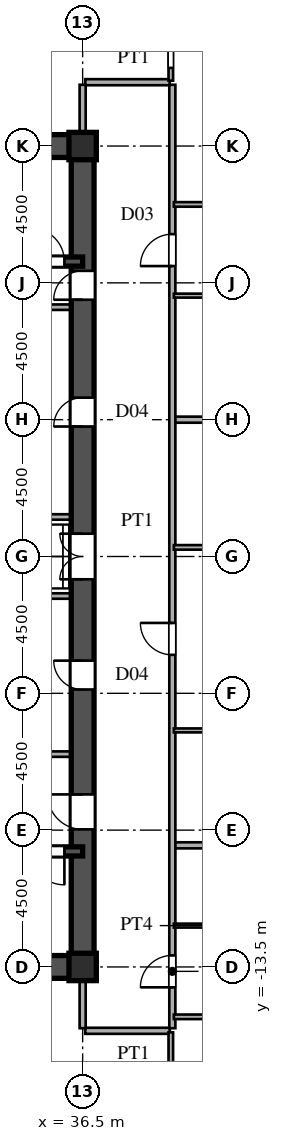
"""IFC4 building model, lengths in metres.
Left out: names, types, materials, properties, quantities, classifications, styles, units other than length and angle.
Written with IfcOpenShell. Run it as: python <this file> out.ifc"""

import sys

from ifc_helpers import new_model, si_unit, direction, frame, frame_2d, origin, origin_2d, place, context, subcontext, project, spatial, rectangle, i_section, extrude, source, transform, mapped, element, fill, save


model = new_model("IFC4")
c1 = context("Model", 3, precision=1e-05, world=origin(), true_north=direction((0.0, 1.0)))
c2 = subcontext(c1, "Body", "Model", "MODEL_VIEW")
j1 = project(units=[si_unit("LENGTHUNIT", "METRE"), si_unit("PLANEANGLEUNIT", "RADIAN")], contexts=[c1])
p1 = place(None, origin())
s1 = spatial("IfcSite", under=j1, at=p1, CompositionType="ELEMENT")
p2 = place(p1, origin())
s2 = spatial("IfcBuilding", under=s1, at=p2, CompositionType="ELEMENT")
p3 = place(p2, frame((0.0, 0.0, 22.5)))
s3 = spatial("IfcBuildingStorey", under=s2, at=p3, CompositionType="ELEMENT", Elevation=22.5)
m1 = source(origin(), c2, "Body", "SweptSolid", [
    extrude(i_section(OverallWidth=0.9, OverallDepth=0.9, WebThickness=0.036, FlangeThickness=0.055, at=origin_2d()), origin(), (0.0, 0.0, 1.0), 3.6),
])
for number, where, z_axis, x_axis in (
    (1, (36.5, -13.5, 0.0), (0.0, 0.0, 1.0), (1.0, 0.0, 0.0)),
    (2, (36.5, 13.5, 0.0), (0.0, 0.0, 1.0), (1.0, 0.0, 0.0)),
):
    element("IfcColumn", number, at=place(p3, frame(where, z_axis=z_axis, x_axis=x_axis)), inside=s3, PredefinedType="COLUMN", context=c2, shape_type="MappedRepresentation", body=[
        mapped(m1, transform((0.0, 0.0, 0.0), scale=1.0)),
    ])
for number, where, z_axis, x_axis in (
    (3, (27.5, -13.5, 0.0), (0.0, 0.0, 1.0), (1.0, 0.0, 0.0)),
    (4, (27.5, 13.5, 0.0), (0.0, 0.0, 1.0), (1.0, 0.0, 0.0)),
):
    element("IfcWall", number, at=place(p3, frame(where, z_axis=z_axis, x_axis=x_axis)), inside=s3, PredefinedType="SHEAR", context=c2, shape_type="SweptSolid", body=[
        extrude(rectangle(XDim=9.0, YDim=0.75, at=frame_2d((4.5, 0.0))), origin(), (0.0, 0.0, 1.0), 3.38),
    ])
p4 = place(p3, frame((36.5, -13.65, 0.0), z_axis=(0.0, 0.0, 1.0), x_axis=(0.0, 1.0, 0.0)))
e5 = element("IfcWall", 5, at=p4, inside=s3, PredefinedType="SHEAR", context=c2, shape_type="SweptSolid", body=[
    extrude(rectangle(XDim=7.15, YDim=0.75, at=frame_2d((3.575, 0.0))), origin(), (0.0, 0.0, 1.0), 3.38),
])
p5 = place(p4, frame((4.675, 0.0, 0.0)))
e6 = element("IfcOpeningElement", 6, at=p5, cuts=e5, PredefinedType="OPENING", context=c2, shape_type="SweptSolid", body=[
    extrude(rectangle(XDim=1.15, YDim=2.2, at=frame_2d((0.575, 1.1))), frame((0.0, 0.385, 0.0), z_axis=(0.0, -1.0, 0.0), x_axis=(1.0, 0.0, 0.0)), (0.0, 0.0, 1.0), 0.77),
])
p6 = place(p3, frame((36.5, -1.3, 0.0), z_axis=(0.0, 0.0, 1.0), x_axis=(0.0, 1.0, 0.0)))
e7 = element("IfcWall", 7, at=p6, inside=s3, PredefinedType="SHEAR", context=c2, shape_type="SweptSolid", body=[
    extrude(rectangle(XDim=2.6, YDim=0.75, at=frame_2d((1.3, 0.0))), origin(), (0.0, 0.0, 1.0), 3.38),
])
p7 = place(p6, frame((0.55, 0.0, 0.0)))
e8 = element("IfcOpeningElement", 8, at=p7, cuts=e7, PredefinedType="OPENING", context=c2, shape_type="SweptSolid", body=[
    extrude(rectangle(XDim=1.5, YDim=2.3, at=frame_2d((0.75, 1.15))), frame((0.0, 0.385, 0.0), z_axis=(0.0, -1.0, 0.0), x_axis=(1.0, 0.0, 0.0)), (0.0, 0.0, 1.0), 0.77),
])
p8 = place(p3, frame((36.5, 8.2, 0.0), z_axis=(0.0, 0.0, 1.0), x_axis=(0.0, 1.0, 0.0)))
e9 = element("IfcWall", 9, at=p8, inside=s3, PredefinedType="SHEAR", context=c2, shape_type="SweptSolid", body=[
    extrude(rectangle(XDim=5.45, YDim=0.75, at=frame_2d((2.725, 0.0))), origin(), (0.0, 0.0, 1.0), 3.38),
])
p9 = place(p8, frame((0.245, 0.0, 0.0)))
e10 = element("IfcOpeningElement", 10, at=p9, cuts=e9, PredefinedType="OPENING", context=c2, shape_type="SweptSolid", body=[
    extrude(rectangle(XDim=0.95, YDim=2.15, at=frame_2d((0.475, 1.075))), frame((0.0, 0.385, 0.0), z_axis=(0.0, -1.0, 0.0), x_axis=(1.0, 0.0, 0.0)), (0.0, 0.0, 1.0), 0.77),
])
p10 = place(p3, frame((36.5, -6.5, 0.0), z_axis=(0.0, 0.0, 1.0), x_axis=(0.0, 1.0, 0.0)))
e11 = element("IfcWall", 11, at=p10, inside=s3, PredefinedType="SHEAR", context=c2, shape_type="SweptSolid", body=[
    extrude(rectangle(XDim=5.2, YDim=0.75, at=frame_2d((2.6, 0.0))), origin(), (0.0, 0.0, 1.0), 3.38),
])
p11 = place(p10, frame((2.125, 0.0, 0.0)))
e12 = element("IfcOpeningElement", 12, at=p11, cuts=e11, PredefinedType="OPENING", context=c2, shape_type="SweptSolid", body=[
    extrude(rectangle(XDim=0.95, YDim=2.15, at=frame_2d((0.475, 1.075))), frame((0.0, 0.385, 0.0), z_axis=(0.0, -1.0, 0.0), x_axis=(1.0, 0.0, 0.0)), (0.0, 0.0, 1.0), 0.77),
])
p12 = place(p3, frame((36.5, 1.3, 0.0), z_axis=(0.0, 0.0, 1.0), x_axis=(0.0, 1.0, 0.0)))
e13 = element("IfcWall", 13, at=p12, inside=s3, PredefinedType="SHEAR", context=c2, shape_type="SweptSolid", body=[
    extrude(rectangle(XDim=6.9, YDim=0.75, at=frame_2d((3.45, 0.0))), origin(), (0.0, 0.0, 1.0), 3.38),
])
p13 = place(p12, frame((2.975, 0.0, 0.0)))
e14 = element("IfcOpeningElement", 14, at=p13, cuts=e13, PredefinedType="OPENING", context=c2, shape_type="SweptSolid", body=[
    extrude(rectangle(XDim=0.95, YDim=2.15, at=frame_2d((0.475, 1.075))), frame((0.0, 0.385, 0.0), z_axis=(0.0, -1.0, 0.0), x_axis=(1.0, 0.0, 0.0)), (0.0, 0.0, 1.0), 0.77),
])
p14 = place(p3, frame((27.5, -9.7, 0.0), z_axis=(0.0, 0.0, 1.0), x_axis=(1.0, 0.0, 0.0)))
e15 = element("IfcWall", 15, at=p14, inside=s3, PredefinedType="SHEAR", context=c2, shape_type="SweptSolid", body=[
    extrude(rectangle(XDim=9.0, YDim=0.3, at=frame_2d((4.5, 0.0))), origin(), (0.0, 0.0, 1.0), 3.38),
])
p15 = place(p14, frame((7.3, 0.0, 0.0)))
e16 = element("IfcOpeningElement", 16, at=p15, cuts=e15, PredefinedType="OPENING", context=c2, shape_type="SweptSolid", body=[
    extrude(rectangle(XDim=1.1, YDim=2.2, at=frame_2d((0.55, 1.1))), frame((0.0, 0.16, 0.0), z_axis=(0.0, -1.0, 0.0), x_axis=(1.0, 0.0, 0.0)), (0.0, 0.0, 1.0), 0.32),
])
p16 = place(p3, frame((27.5, 9.7, 0.0), z_axis=(0.0, 0.0, 1.0), x_axis=(1.0, 0.0, 0.0)))
e17 = element("IfcWall", 17, at=p16, inside=s3, PredefinedType="SHEAR", context=c2, shape_type="SweptSolid", body=[
    extrude(rectangle(XDim=9.0, YDim=0.3, at=frame_2d((4.5, 0.0))), origin(), (0.0, 0.0, 1.0), 3.38),
])
p17 = place(p16, frame((7.3, 0.0, 0.0)))
e18 = element("IfcOpeningElement", 18, at=p17, cuts=e17, PredefinedType="OPENING", context=c2, shape_type="SweptSolid", body=[
    extrude(rectangle(XDim=1.1, YDim=2.2, at=frame_2d((0.55, 1.1))), frame((0.0, 0.16, 0.0), z_axis=(0.0, -1.0, 0.0), x_axis=(1.0, 0.0, 0.0)), (0.0, 0.0, 1.0), 0.32),
])
for number, where, z_axis, x_axis in (
    (19, (30.45, -6.5, 0.0), (0.0, 0.0, 1.0), (1.0, 0.0, 0.0)),
    (20, (30.45, 8.2, 0.0), (0.0, 0.0, 1.0), (1.0, 0.0, 0.0)),
):
    element("IfcWall", number, at=place(p3, frame(where, z_axis=z_axis, x_axis=x_axis)), inside=s3, PredefinedType="PARTITIONING", context=c2, shape_type="SweptSolid", body=[
        extrude(rectangle(XDim=5.7, YDim=0.18, at=frame_2d((2.85, 0.0))), origin(), (0.0, 0.0, 1.0), 3.38),
    ])
for number, where, z_axis, x_axis in (
    (21, (33.2, -1.3, 0.0), (0.0, 0.0, 1.0), (1.0, 0.0, 0.0)),
    (22, (33.2, 1.3, 0.0), (0.0, 0.0, 1.0), (1.0, 0.0, 0.0)),
):
    element("IfcWall", number, at=place(p3, frame(where, z_axis=z_axis, x_axis=x_axis)), inside=s3, PredefinedType="PARTITIONING", context=c2, shape_type="SweptSolid", body=[
        extrude(rectangle(XDim=2.95, YDim=0.18, at=frame_2d((1.475, 0.0))), origin(), (0.0, 0.0, 1.0), 3.38),
    ])
p18 = place(p3, frame((36.585, -15.6, 0.0), z_axis=(0.0, 0.0, 1.0), x_axis=(1.0, 0.0, 0.0)))
e23 = element("IfcWall", 23, at=p18, inside=s3, PredefinedType="PARTITIONING", context=c2, shape_type="SweptSolid", body=[
    extrude(rectangle(XDim=2.78, YDim=0.2, at=frame_2d((1.39, 0.0))), origin(), (0.0, 0.0, 1.0), 3.38),
])
p19 = place(p3, frame((39.5, -15.14, 0.0), z_axis=(0.0, 0.0, 1.0), x_axis=(1.0, 0.0, 0.0)))
e24 = element("IfcWall", 24, at=p19, inside=s3, PredefinedType="PARTITIONING", context=c2, shape_type="SweptSolid", body=[
    extrude(rectangle(XDim=4.05, YDim=0.15, at=frame_2d((2.025, 0.0))), origin(), (0.0, 0.0, 1.0), 3.38),
])
p20 = place(p19, frame((1.55, 0.0, 0.0)))
e25 = element("IfcOpeningElement", 25, at=p20, cuts=e24, PredefinedType="OPENING", context=c2, shape_type="SweptSolid", body=[
    extrude(rectangle(XDim=0.95, YDim=2.15, at=frame_2d((0.475, 1.075))), frame((0.0, 0.085, 0.0), z_axis=(0.0, -1.0, 0.0), x_axis=(1.0, 0.0, 0.0)), (0.0, 0.0, 1.0), 0.17),
])
p21 = place(p3, frame((39.5, -12.14, 0.0), z_axis=(0.0, 0.0, 1.0), x_axis=(1.0, 0.0, 0.0)))
e26 = element("IfcWall", 26, at=p21, inside=s3, PredefinedType="PARTITIONING", context=c2, shape_type="SweptSolid", body=[
    extrude(rectangle(XDim=4.05, YDim=0.13, at=frame_2d((2.025, 0.0))), origin(), (0.0, 0.0, 1.0), 3.38),
])
p22 = place(p21, frame((1.585, 0.0, 0.0)))
e27 = element("IfcOpeningElement", 27, at=p22, cuts=e26, PredefinedType="OPENING", context=c2, shape_type="SweptSolid", body=[
    extrude(rectangle(XDim=0.88, YDim=2.1, at=frame_2d((0.44, 1.05))), frame((0.0, 0.075, 0.0), z_axis=(0.0, -1.0, 0.0), x_axis=(1.0, 0.0, 0.0)), (0.0, 0.0, 1.0), 0.15),
])
p23 = place(p3, frame((39.53, -9.5, 0.0), z_axis=(0.0, 0.0, 1.0), x_axis=(1.0, 0.0, 0.0)))
e28 = element("IfcWall", 28, at=p23, inside=s3, PredefinedType="PARTITIONING", context=c2, shape_type="SweptSolid", body=[
    extrude(rectangle(XDim=32.845, YDim=0.2, at=frame_2d((16.422, 0.0))), origin(), (0.0, 0.0, 1.0), 3.38),
])
p24 = place(p3, frame((39.5, -5.72, 0.0), z_axis=(0.0, 0.0, 1.0), x_axis=(1.0, 0.0, 0.0)))
e29 = element("IfcWall", 29, at=p24, inside=s3, PredefinedType="PARTITIONING", context=c2, shape_type="SweptSolid", body=[
    extrude(rectangle(XDim=4.05, YDim=0.13, at=frame_2d((2.025, 0.0))), origin(), (0.0, 0.0, 1.0), 3.38),
])
p25 = place(p24, frame((1.585, 0.0, 0.0)))
e30 = element("IfcOpeningElement", 30, at=p25, cuts=e29, PredefinedType="OPENING", context=c2, shape_type="SweptSolid", body=[
    extrude(rectangle(XDim=0.88, YDim=2.1, at=frame_2d((0.44, 1.05))), frame((0.0, 0.075, 0.0), z_axis=(0.0, -1.0, 0.0), x_axis=(1.0, 0.0, 0.0)), (0.0, 0.0, 1.0), 0.15),
])
p26 = place(p3, frame((39.5, 0.3, 0.0), z_axis=(0.0, 0.0, 1.0), x_axis=(1.0, 0.0, 0.0)))
e31 = element("IfcWall", 31, at=p26, inside=s3, PredefinedType="PARTITIONING", context=c2, shape_type="SweptSolid", body=[
    extrude(rectangle(XDim=4.05, YDim=0.15, at=frame_2d((2.025, 0.0))), origin(), (0.0, 0.0, 1.0), 3.38),
])
p27 = place(p26, frame((1.55, 0.0, 0.0)))
e32 = element("IfcOpeningElement", 32, at=p27, cuts=e31, PredefinedType="OPENING", context=c2, shape_type="SweptSolid", body=[
    extrude(rectangle(XDim=0.95, YDim=2.15, at=frame_2d((0.475, 1.075))), frame((0.0, 0.085, 0.0), z_axis=(0.0, -1.0, 0.0), x_axis=(1.0, 0.0, 0.0)), (0.0, 0.0, 1.0), 0.17),
])
p28 = place(p3, frame((39.53, 4.5, 0.0), z_axis=(0.0, 0.0, 1.0), x_axis=(1.0, 0.0, 0.0)))
e33 = element("IfcWall", 33, at=p28, inside=s3, PredefinedType="PARTITIONING", context=c2, shape_type="SweptSolid", body=[
    extrude(rectangle(XDim=14.99, YDim=0.2, at=frame_2d((7.495, 0.0))), origin(), (0.0, 0.0, 1.0), 2.68),
])
p29 = place(p3, frame((39.5, 8.58, 0.0), z_axis=(0.0, 0.0, 1.0), x_axis=(1.0, 0.0, 0.0)))
e34 = element("IfcWall", 34, at=p29, inside=s3, PredefinedType="PARTITIONING", context=c2, shape_type="SweptSolid", body=[
    extrude(rectangle(XDim=4.05, YDim=0.13, at=frame_2d((2.025, 0.0))), origin(), (0.0, 0.0, 1.0), 3.38),
])
p30 = place(p29, frame((1.585, 0.0, 0.0)))
e35 = element("IfcOpeningElement", 35, at=p30, cuts=e34, PredefinedType="OPENING", context=c2, shape_type="SweptSolid", body=[
    extrude(rectangle(XDim=0.88, YDim=2.1, at=frame_2d((0.44, 1.05))), frame((0.0, 0.075, 0.0), z_axis=(0.0, -1.0, 0.0), x_axis=(1.0, 0.0, 0.0)), (0.0, 0.0, 1.0), 0.15),
])
p31 = place(p3, frame((39.5, 11.58, 0.0), z_axis=(0.0, 0.0, 1.0), x_axis=(1.0, 0.0, 0.0)))
e36 = element("IfcWall", 36, at=p31, inside=s3, PredefinedType="PARTITIONING", context=c2, shape_type="SweptSolid", body=[
    extrude(rectangle(XDim=4.05, YDim=0.15, at=frame_2d((2.025, 0.0))), origin(), (0.0, 0.0, 1.0), 3.38),
])
p32 = place(p31, frame((1.55, 0.0, 0.0)))
e37 = element("IfcOpeningElement", 37, at=p32, cuts=e36, PredefinedType="OPENING", context=c2, shape_type="SweptSolid", body=[
    extrude(rectangle(XDim=0.95, YDim=2.15, at=frame_2d((0.475, 1.075))), frame((0.0, 0.085, 0.0), z_axis=(0.0, -1.0, 0.0), x_axis=(1.0, 0.0, 0.0)), (0.0, 0.0, 1.0), 0.17),
])
p33 = place(p3, frame((36.585, 15.6, 0.0), z_axis=(0.0, 0.0, 1.0), x_axis=(1.0, 0.0, 0.0)))
e38 = element("IfcWall", 38, at=p33, inside=s3, PredefinedType="PARTITIONING", context=c2, shape_type="SweptSolid", body=[
    extrude(rectangle(XDim=2.78, YDim=0.2, at=frame_2d((1.39, 0.0))), origin(), (0.0, 0.0, 1.0), 3.38),
])
for number, where, z_axis, x_axis in (
    (39, (36.5, -15.515, 0.0), (0.0, 0.0, 1.0), (0.0, 1.0, 0.0)),
    (40, (36.5, 13.88, 0.0), (0.0, 0.0, 1.0), (0.0, 1.0, 0.0)),
):
    element("IfcWall", number, at=place(p3, frame(where, z_axis=z_axis, x_axis=x_axis)), inside=s3, PredefinedType="PARTITIONING", context=c2, shape_type="SweptSolid", body=[
        extrude(rectangle(XDim=1.635, YDim=0.2, at=frame_2d((0.817, 0.0))), origin(), (0.0, 0.0, 1.0), 2.68),
    ])
p34 = place(p3, frame((39.4, -23.433, 0.0), z_axis=(0.0, 0.0, 1.0), x_axis=(0.0, 1.0, 0.0)))
e41 = element("IfcWall", 41, at=p34, inside=s3, PredefinedType="PARTITIONING", context=c2, shape_type="SweptSolid", body=[
    extrude(rectangle(XDim=7.783, YDim=0.15, at=frame_2d((3.892, 0.0))), origin(), (0.0, 0.0, 1.0), 3.38),
])
p35 = place(p34, frame((1.134, 0.0, 0.0)))
e42 = element("IfcOpeningElement", 42, at=p35, cuts=e41, PredefinedType="OPENING", context=c2, shape_type="SweptSolid", body=[
    extrude(rectangle(XDim=0.95, YDim=2.15, at=frame_2d((0.475, 1.075))), frame((0.0, 0.085, 0.0), z_axis=(0.0, -1.0, 0.0), x_axis=(1.0, 0.0, 0.0)), (0.0, 0.0, 1.0), 0.17),
])
p36 = place(p3, frame((39.4, 15.65, 0.0), z_axis=(0.0, 0.0, 1.0), x_axis=(0.0, 1.0, 0.0)))
e43 = element("IfcWall", 43, at=p36, inside=s3, PredefinedType="PARTITIONING", context=c2, shape_type="SweptSolid", body=[
    extrude(rectangle(XDim=7.783, YDim=0.15, at=frame_2d((3.892, 0.0))), origin(), (0.0, 0.0, 1.0), 3.38),
])
p37 = place(p36, frame((0.419, 0.0, 0.0)))
e44 = element("IfcOpeningElement", 44, at=p37, cuts=e43, PredefinedType="OPENING", context=c2, shape_type="SweptSolid", body=[
    extrude(rectangle(XDim=0.95, YDim=2.15, at=frame_2d((0.475, 1.075))), frame((0.0, 0.085, 0.0), z_axis=(0.0, -1.0, 0.0), x_axis=(1.0, 0.0, 0.0)), (0.0, 0.0, 1.0), 0.17),
])
p38 = place(p36, frame((2.744, 0.0, 0.0)))
e45 = element("IfcOpeningElement", 45, at=p38, cuts=e43, PredefinedType="OPENING", context=c2, shape_type="SweptSolid", body=[
    extrude(rectangle(XDim=0.95, YDim=2.15, at=frame_2d((0.475, 1.075))), frame((0.0, 0.085, 0.0), z_axis=(0.0, -1.0, 0.0), x_axis=(1.0, 0.0, 0.0)), (0.0, 0.0, 1.0), 0.17),
])
p39 = place(p3, frame((39.45, -15.515, 0.0), z_axis=(0.0, 0.0, 1.0), x_axis=(0.0, 1.0, 0.0)))
e46 = element("IfcWall", 46, at=p39, inside=s3, PredefinedType="PARTITIONING", context=c2, shape_type="SweptSolid", body=[
    extrude(rectangle(XDim=31.03, YDim=0.2, at=frame_2d((15.515, 0.0))), origin(), (0.0, 0.0, 1.0), 3.38),
])
p40 = place(p39, frame((1.345, 0.0, 0.0)))
e47 = element("IfcOpeningElement", 47, at=p40, cuts=e46, PredefinedType="OPENING", context=c2, shape_type="SweptSolid", body=[
    extrude(rectangle(XDim=1.05, YDim=2.25, at=frame_2d((0.525, 1.125))), frame((0.0, 0.11, 0.0), z_axis=(0.0, -1.0, 0.0), x_axis=(1.0, 0.0, 0.0)), (0.0, 0.0, 1.0), 0.22),
])
p41 = place(p39, frame((12.28, 0.0, 0.0)))
e48 = element("IfcOpeningElement", 48, at=p41, cuts=e46, PredefinedType="OPENING", context=c2, shape_type="SweptSolid", body=[
    extrude(rectangle(XDim=1.05, YDim=2.25, at=frame_2d((0.525, 1.125))), frame((0.0, 0.11, 0.0), z_axis=(0.0, -1.0, 0.0), x_axis=(1.0, 0.0, 0.0)), (0.0, 0.0, 1.0), 0.22),
])
p42 = place(p39, frame((25.067, 0.0, 0.0)))
e49 = element("IfcOpeningElement", 49, at=p42, cuts=e46, PredefinedType="OPENING", context=c2, shape_type="SweptSolid", body=[
    extrude(rectangle(XDim=1.05, YDim=2.25, at=frame_2d((0.525, 1.125))), frame((0.0, 0.11, 0.0), z_axis=(0.0, -1.0, 0.0), x_axis=(1.0, 0.0, 0.0)), (0.0, 0.0, 1.0), 0.22),
])
m2 = source(origin(), c2, "Body", "SweptSolid", [
    extrude(rectangle(XDim=1.15, YDim=2.2, at=frame_2d((0.575, 1.1))), frame((0.0, 0.025, 0.0), z_axis=(0.0, -1.0, 0.0), x_axis=(1.0, 0.0, 0.0)), (0.0, 0.0, 1.0), 0.05),
])
p43 = place(p5, origin())
e50 = element("IfcDoor", 50, at=p43, inside=s3, OperationType="SINGLE_SWING_RIGHT", PredefinedType="DOOR", context=c2, shape_type="MappedRepresentation", body=[
    mapped(m2, transform((0.0, 0.0, 0.0), scale=1.0)),
])
fill(e6, e50)
m3 = source(origin(), c2, "Body", "SweptSolid", [
    extrude(rectangle(XDim=1.5, YDim=2.3, at=frame_2d((0.75, 1.15))), frame((0.0, 0.025, 0.0), z_axis=(0.0, -1.0, 0.0), x_axis=(1.0, 0.0, 0.0)), (0.0, 0.0, 1.0), 0.05),
])
p44 = place(p7, origin())
e51 = element("IfcDoor", 51, at=p44, inside=s3, OperationType="DOUBLE_SWING_LEFT", PredefinedType="DOOR", context=c2, shape_type="MappedRepresentation", body=[
    mapped(m3, transform((0.0, 0.0, 0.0), scale=1.0)),
])
fill(e8, e51)
m4 = source(origin(), c2, "Body", "SweptSolid", [
    extrude(rectangle(XDim=0.95, YDim=2.15, at=frame_2d((0.475, 1.075))), frame((0.0, 0.025, 0.0), z_axis=(0.0, -1.0, 0.0), x_axis=(1.0, 0.0, 0.0)), (0.0, 0.0, 1.0), 0.05),
])
p45 = place(p9, origin())
e52 = element("IfcDoor", 52, at=p45, inside=s3, OperationType="SINGLE_SWING_LEFT", PredefinedType="DOOR", context=c2, shape_type="MappedRepresentation", body=[
    mapped(m4, transform((0.0, 0.0, 0.0), scale=1.0)),
])
fill(e10, e52)
p46 = place(p11, origin())
e53 = element("IfcDoor", 53, at=p46, inside=s3, OperationType="SINGLE_SWING_RIGHT", PredefinedType="DOOR", context=c2, shape_type="MappedRepresentation", body=[
    mapped(m4, transform((0.0, 0.0, 0.0), scale=1.0)),
])
fill(e12, e53)
p47 = place(p13, origin())
e54 = element("IfcDoor", 54, at=p47, inside=s3, OperationType="SINGLE_SWING_LEFT", PredefinedType="DOOR", context=c2, shape_type="MappedRepresentation", body=[
    mapped(m4, transform((0.0, 0.0, 0.0), scale=1.0)),
])
fill(e14, e54)
m5 = source(origin(), c2, "Body", "SweptSolid", [
    extrude(rectangle(XDim=1.1, YDim=2.2, at=frame_2d((0.55, 1.1))), frame((0.0, 0.025, 0.0), z_axis=(0.0, -1.0, 0.0), x_axis=(1.0, 0.0, 0.0)), (0.0, 0.0, 1.0), 0.05),
])
p48 = place(p15, frame((1.1, 0.0, 0.0), z_axis=(0.0, 0.0, 1.0), x_axis=(-1.0, 0.0, 0.0)))
e55 = element("IfcDoor", 55, at=p48, inside=s3, OperationType="SINGLE_SWING_RIGHT", PredefinedType="DOOR", context=c2, shape_type="MappedRepresentation", body=[
    mapped(m5, transform((0.0, 0.0, 0.0), scale=1.0)),
])
fill(e16, e55)
p49 = place(p17, origin())
e56 = element("IfcDoor", 56, at=p49, inside=s3, OperationType="SINGLE_SWING_LEFT", PredefinedType="DOOR", context=c2, shape_type="MappedRepresentation", body=[
    mapped(m5, transform((0.0, 0.0, 0.0), scale=1.0)),
])
fill(e18, e56)
m6 = source(origin(), c2, "Body", "SweptSolid", [
    extrude(rectangle(XDim=1.05, YDim=2.25, at=frame_2d((0.525, 1.125))), frame((0.0, 0.025, 0.0), z_axis=(0.0, -1.0, 0.0), x_axis=(1.0, 0.0, 0.0)), (0.0, 0.0, 1.0), 0.05),
])
p50 = place(p40, origin())
e57 = element("IfcDoor", 57, at=p50, inside=s3, OperationType="SINGLE_SWING_LEFT", PredefinedType="DOOR", context=c2, shape_type="MappedRepresentation", body=[
    mapped(m6, transform((0.0, 0.0, 0.0), scale=1.0)),
])
fill(e47, e57)
p51 = place(p41, origin())
e58 = element("IfcDoor", 58, at=p51, inside=s3, OperationType="SINGLE_SWING_RIGHT", PredefinedType="DOOR", context=c2, shape_type="MappedRepresentation", body=[
    mapped(m6, transform((0.0, 0.0, 0.0), scale=1.0)),
])
fill(e48, e58)
p52 = place(p42, origin())
e59 = element("IfcDoor", 59, at=p52, inside=s3, OperationType="SINGLE_SWING_LEFT", PredefinedType="DOOR", context=c2, shape_type="MappedRepresentation", body=[
    mapped(m6, transform((0.0, 0.0, 0.0), scale=1.0)),
])
fill(e49, e59)
save(model, sys.argv[1])
